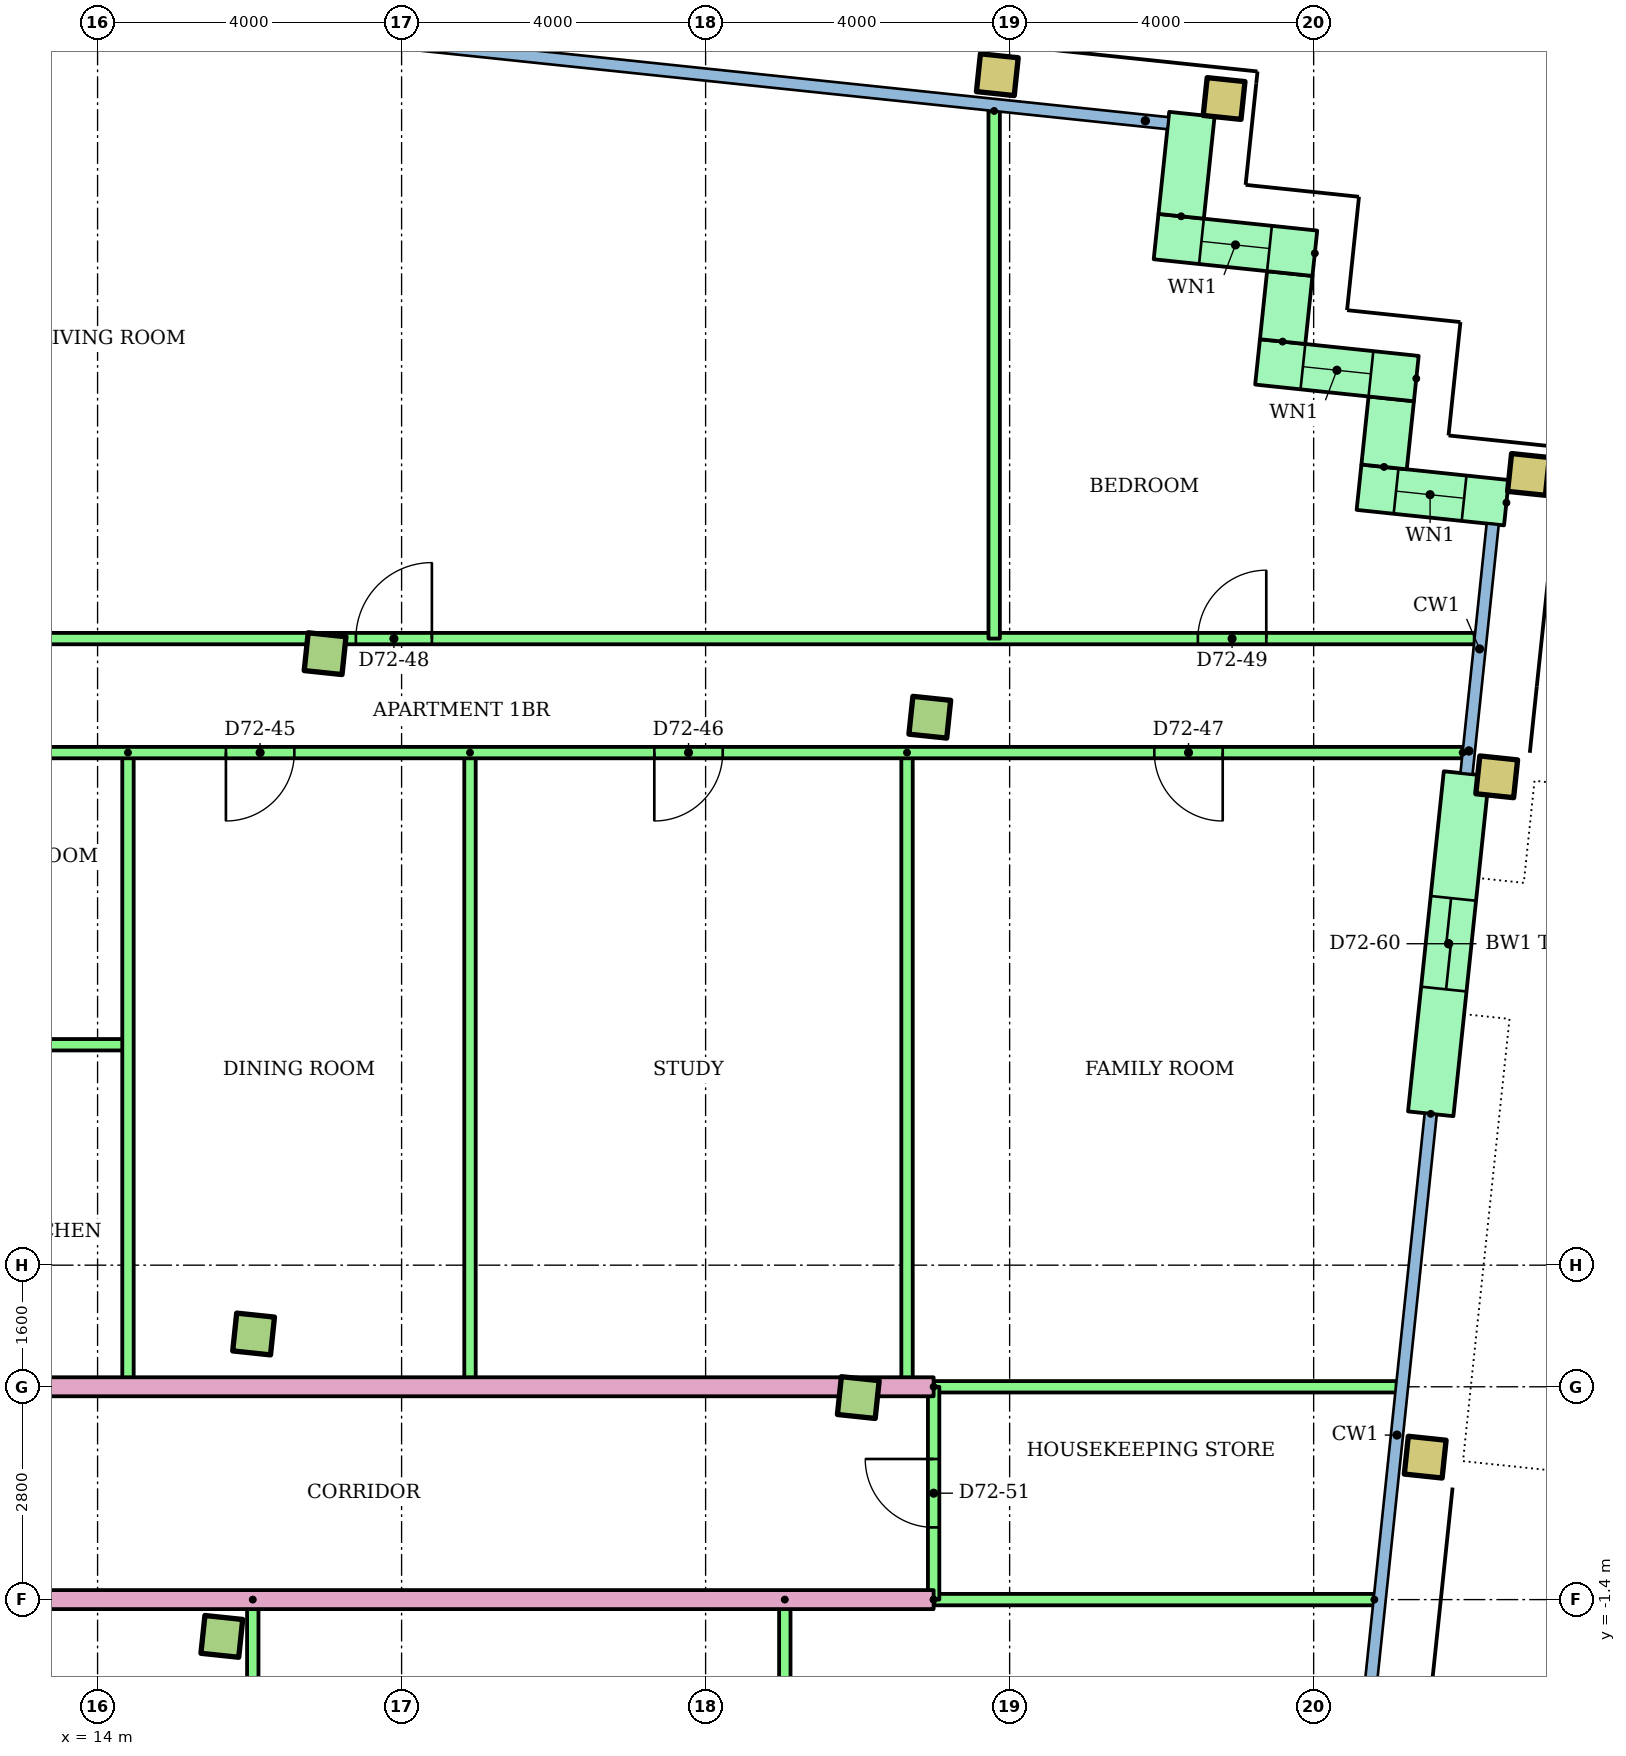
"""IFC4 building model, lengths in metres.
Left out: names, types, materials, properties, quantities, classifications, styles, units other than length and angle.
Written with IfcOpenShell. Run it as: python <this file> out.ifc"""

import sys

from ifc_helpers import new_model, si_unit, direction, frame, frame_2d, origin, origin_2d, place, context, subcontext, project, spatial, rectangle, hollow_rectangle, extrude, element, fill, save


model = new_model("IFC4")
c1 = context("Model", 3, precision=1e-05, world=origin(), true_north=direction((0.0, 1.0)))
c2 = subcontext(c1, "Body", "Model", "MODEL_VIEW")
j1 = project(units=[si_unit("LENGTHUNIT", "METRE"), si_unit("PLANEANGLEUNIT", "RADIAN")], contexts=[c1])
p1 = place(None, origin())
s1 = spatial("IfcSite", under=j1, at=p1, CompositionType="ELEMENT")
p2 = place(p1, origin())
s2 = spatial("IfcBuilding", under=s1, at=p2, CompositionType="ELEMENT")
p3 = place(p2, frame((0.0, 0.0, 275.5)))
s3 = spatial("IfcBuildingStorey", under=s2, at=p3, CompositionType="ELEMENT", Elevation=275.5)
for number, where, z_axis, x_axis in (
    (1, (15.635, -1.884, 0.0), (0.0, 0.0, 1.0), (0.995, -0.105, 0.0)),
    (2, (16.053, 2.094, 0.0), (0.0, 0.0, 1.0), (0.995, -0.105, 0.0)),
    (3, (24.009, 1.258, 0.0), (0.0, 0.0, 1.0), (0.995, -0.105, 0.0)),
):
    element("IfcColumn", number, at=place(p3, frame(where, z_axis=z_axis, x_axis=x_axis)), inside=s3, PredefinedType="COLUMN", context=c2, shape_type="SweptSolid", body=[
        extrude(rectangle(XDim=0.5, YDim=0.5, at=origin_2d()), origin(), (0.0, 0.0, 1.0), 3.2),
    ])
p4 = place(p3, frame((31.468, 0.474, 0.0), z_axis=(0.0, 0.0, 1.0), x_axis=(0.994521895368, -0.104528463268, 0.0)))
e4 = element("IfcColumn", 4, at=p4, inside=s3, PredefinedType="COLUMN", context=c2, shape_type="SweptSolid", body=[
    extrude(hollow_rectangle(XDim=0.5, YDim=0.5, WallThickness=0.025, at=origin_2d()), origin(), (0.0, 0.0, 1.0), 3.2),
])
for number, where, z_axis, x_axis in (
    (5, (16.993, 11.045, 0.0), (0.0, 0.0, 1.0), (0.995, -0.105, 0.0)),
    (6, (24.95, 10.209, 0.0), (0.0, 0.0, 1.0), (0.995, -0.105, 0.0)),
):
    element("IfcColumn", number, at=place(p3, frame(where, z_axis=z_axis, x_axis=x_axis)), inside=s3, PredefinedType="COLUMN", context=c2, shape_type="SweptSolid", body=[
        extrude(rectangle(XDim=0.5, YDim=0.5, at=origin_2d()), origin(), (0.0, 0.0, 1.0), 3.2),
    ])
for number, where, z_axis, x_axis in (
    (7, (32.409, 9.425, 0.0), (0.0, 0.0, 1.0), (0.995, -0.105, 0.0)),
    (8, (32.827, 13.403, 0.0), (0.0, 0.0, 1.0), (0.995, -0.105, 0.0)),
    (9, (25.838, 18.662, 0.0), (0.0, 0.0, 1.0), (0.995, -0.105, 0.0)),
    (10, (28.822, 18.349, 0.0), (0.0, 0.0, 1.0), (0.995, -0.105, 0.0)),
):
    element("IfcColumn", number, at=place(p3, frame(where, z_axis=z_axis, x_axis=x_axis)), inside=s3, PredefinedType="COLUMN", context=c2, shape_type="SweptSolid", body=[
        extrude(hollow_rectangle(XDim=0.5, YDim=0.5, WallThickness=0.025, at=origin_2d()), origin(), (0.0, 0.0, 1.0), 3.2),
    ])
p5 = place(p3, frame((32.536, 13.031, 0.0), z_axis=(0.0, 0.0, 1.0), x_axis=(-0.994534226826, 0.104411070641, 0.0)))
e11 = element("IfcWall", 11, at=p5, inside=s3, PredefinedType="STANDARD", context=c2, shape_type="SweptSolid", body=[
    extrude(rectangle(XDim=1.95, YDim=0.6, at=frame_2d((0.975, 0.0))), origin(), (0.0, 0.0, 1.0), 2.92),
])
p6 = place(p5, frame((0.56, 0.0, 0.9)))
e12 = element("IfcOpeningElement", 12, at=p6, cuts=e11, PredefinedType="OPENING", context=c2, shape_type="SweptSolid", body=[
    extrude(rectangle(XDim=0.9, YDim=1.5, at=frame_2d((0.45, 0.75))), frame((0.0, 0.31, 0.0), z_axis=(0.0, -1.0, 0.0), x_axis=(1.0, 0.0, 0.0)), (0.0, 0.0, 1.0), 0.62),
])
p7 = place(p3, frame((30.927, 13.502, 0.0), z_axis=(0.0, 0.0, 1.0), x_axis=(0.104416541099, 0.994533652495, 0.0)))
e13 = element("IfcWall", 13, at=p7, inside=s3, PredefinedType="STANDARD", context=c2, shape_type="SweptSolid", body=[
    extrude(rectangle(XDim=0.9, YDim=0.6, at=frame_2d((0.45, 0.0))), origin(), (0.0, 0.0, 1.0), 2.92),
])
p8 = place(p3, frame((31.351, 14.664, 0.0), z_axis=(0.0, 0.0, 1.0), x_axis=(-0.994523910136, 0.104509292252, 0.0)))
e14 = element("IfcWall", 14, at=p8, inside=s3, PredefinedType="STANDARD", context=c2, shape_type="SweptSolid", body=[
    extrude(rectangle(XDim=2.1, YDim=0.6, at=frame_2d((1.05, 0.0))), origin(), (0.0, 0.0, 1.0), 2.92),
])
p9 = place(p8, frame((0.6, 0.0, 0.9)))
e15 = element("IfcOpeningElement", 15, at=p9, cuts=e14, PredefinedType="OPENING", context=c2, shape_type="SweptSolid", body=[
    extrude(rectangle(XDim=0.9, YDim=1.5, at=frame_2d((0.45, 0.75))), frame((0.0, 0.31, 0.0), z_axis=(0.0, -1.0, 0.0), x_axis=(1.0, 0.0, 0.0)), (0.0, 0.0, 1.0), 0.62),
])
p10 = place(p3, frame((29.592, 15.151, 0.0), z_axis=(0.0, 0.0, 1.0), x_axis=(0.104444712852, 0.994530694326, 0.0)))
e16 = element("IfcWall", 16, at=p10, inside=s3, PredefinedType="STANDARD", context=c2, shape_type="SweptSolid", body=[
    extrude(rectangle(XDim=0.9, YDim=0.6, at=frame_2d((0.45, 0.0))), origin(), (0.0, 0.0, 1.0), 2.92),
])
p11 = place(p3, frame((30.015, 16.312, 0.0), z_axis=(0.0, 0.0, 1.0), x_axis=(-0.994510548187, 0.104636368175, 0.0)))
e17 = element("IfcWall", 17, at=p11, inside=s3, PredefinedType="STANDARD", context=c2, shape_type="SweptSolid", body=[
    extrude(rectangle(XDim=2.1, YDim=0.6, at=frame_2d((1.05, 0.0))), origin(), (0.0, 0.0, 1.0), 2.92),
])
p12 = place(p11, frame((0.6, 0.0, 0.9)))
e18 = element("IfcOpeningElement", 18, at=p12, cuts=e17, PredefinedType="OPENING", context=c2, shape_type="SweptSolid", body=[
    extrude(rectangle(XDim=0.9, YDim=1.5, at=frame_2d((0.45, 0.75))), frame((0.0, 0.31, 0.0), z_axis=(0.0, -1.0, 0.0), x_axis=(1.0, 0.0, 0.0)), (0.0, 0.0, 1.0), 0.62),
])
p13 = place(p3, frame((28.257, 16.799, 0.0), z_axis=(0.0, 0.0, 1.0), x_axis=(0.104534153452, 0.994521297289, 0.0)))
e19 = element("IfcWall", 19, at=p13, inside=s3, PredefinedType="STANDARD", context=c2, shape_type="SweptSolid", body=[
    extrude(rectangle(XDim=1.35, YDim=0.6, at=frame_2d((0.675, 0.0))), origin(), (0.0, 0.0, 1.0), 2.92),
])
p14 = place(p3, frame((31.54, 4.991, 0.0), z_axis=(0.0, 0.0, 1.0), x_axis=(0.104546400045, 0.994520009974, 0.0)))
e20 = element("IfcWall", 20, at=p14, inside=s3, PredefinedType="STANDARD", context=c2, shape_type="SweptSolid", body=[
    extrude(rectangle(XDim=4.5, YDim=0.6, at=frame_2d((2.25, 0.0))), origin(), (0.0, 0.0, 1.0), 2.92),
])
p15 = place(p14, frame((1.65, 0.0, 0.0)))
e21 = element("IfcOpeningElement", 21, at=p15, cuts=e20, PredefinedType="OPENING", context=c2, shape_type="SweptSolid", body=[
    extrude(rectangle(XDim=1.2, YDim=2.1, at=frame_2d((0.6, 1.05))), frame((0.0, 0.31, 0.0), z_axis=(0.0, -1.0, 0.0), x_axis=(1.0, 0.0, 0.0)), (0.0, 0.0, 1.0), 0.62),
])
for number, where, z_axis, x_axis in (
    (22, (16.042, -1.4, 0.0), (0.0, 0.0, 1.0), (0.0, -1.0, 0.0)),
    (23, (23.042, -1.4, 0.0), (0.0, 0.0, 1.0), (0.0, -1.0, 0.0)),
):
    element("IfcWall", number, at=place(p3, frame(where, z_axis=z_axis, x_axis=x_axis)), inside=s3, PredefinedType="PARTITIONING", context=c2, shape_type="SweptSolid", body=[
        extrude(rectangle(XDim=6.582, YDim=0.15, at=frame_2d((3.291, 0.0))), origin(), (0.0, 0.0, 1.0), 2.4),
    ])
p16 = place(p3, frame((25.0, -1.4, 0.0), z_axis=(0.0, 0.0, 1.0), x_axis=(-1.0, 0.0, 0.0)))
e24 = element("IfcWall", 24, at=p16, inside=s3, PredefinedType="PARTITIONING", context=c2, shape_type="SweptSolid", body=[
    extrude(rectangle(XDim=15.0, YDim=0.25, at=frame_2d((7.5, 0.0))), origin(), (0.0, 0.0, 1.0), 2.4),
])
p17 = place(p3, frame((30.798, -1.4, 0.0), z_axis=(0.0, 0.0, 1.0), x_axis=(-1.0, 0.0, 0.0)))
e25 = element("IfcWall", 25, at=p17, inside=s3, PredefinedType="PARTITIONING", context=c2, shape_type="SweptSolid", body=[
    extrude(rectangle(XDim=5.798, YDim=0.15, at=frame_2d((2.899, 0.0))), origin(), (0.0, 0.0, 1.0), 2.4),
])
p18 = place(p3, frame((12.0, 5.9, 0.0)))
e26 = element("IfcWall", 26, at=p18, inside=s3, PredefinedType="PARTITIONING", context=c2, shape_type="SweptSolid", body=[
    extrude(rectangle(XDim=2.4, YDim=0.15, at=frame_2d((1.2, 0.0))), origin(), (0.0, 0.0, 1.0), 2.4),
])
for number, where, z_axis, x_axis in (
    (27, (14.4, 9.743, 0.0), (0.0, 0.0, 1.0), (0.0, -1.0, 0.0)),
    (28, (18.9, 9.743, 0.0), (0.0, 0.0, 1.0), (0.0, -1.0, 0.0)),
    (29, (24.65, 9.743, 0.0), (0.0, 0.0, 1.0), (0.0, -1.0, 0.0)),
):
    element("IfcWall", number, at=place(p3, frame(where, z_axis=z_axis, x_axis=x_axis)), inside=s3, PredefinedType="PARTITIONING", context=c2, shape_type="SweptSolid", body=[
        extrude(rectangle(XDim=8.344, YDim=0.15, at=frame_2d((4.172, 0.0))), origin(), (0.0, 0.0, 1.0), 2.4),
    ])
p19 = place(p3, frame((31.96, 9.743, 0.0), z_axis=(0.0, 0.0, 1.0), x_axis=(-1.0, 0.0, 0.0)))
e30 = element("IfcWall", 30, at=p19, inside=s3, PredefinedType="PARTITIONING", context=c2, shape_type="SweptSolid", body=[
    extrude(rectangle(XDim=19.96, YDim=0.15, at=frame_2d((9.98, 0.0))), origin(), (0.0, 0.0, 1.0), 2.4),
])
p20 = place(p19, frame((15.372, 0.0, 0.0)))
e31 = element("IfcOpeningElement", 31, at=p20, cuts=e30, PredefinedType="OPENING", context=c2, shape_type="SweptSolid", body=[
    extrude(rectangle(XDim=0.9, YDim=2.1, at=frame_2d((0.45, 1.05))), frame((0.0, 0.085, 0.0), z_axis=(0.0, -1.0, 0.0), x_axis=(1.0, 0.0, 0.0)), (0.0, 0.0, 1.0), 0.17),
])
p21 = place(p19, frame((9.735, 0.0, 0.0)))
e32 = element("IfcOpeningElement", 32, at=p21, cuts=e30, PredefinedType="OPENING", context=c2, shape_type="SweptSolid", body=[
    extrude(rectangle(XDim=0.9, YDim=2.1, at=frame_2d((0.45, 1.05))), frame((0.0, 0.085, 0.0), z_axis=(0.0, -1.0, 0.0), x_axis=(1.0, 0.0, 0.0)), (0.0, 0.0, 1.0), 0.17),
])
p22 = place(p19, frame((3.157, 0.0, 0.0)))
e33 = element("IfcOpeningElement", 33, at=p22, cuts=e30, PredefinedType="OPENING", context=c2, shape_type="SweptSolid", body=[
    extrude(rectangle(XDim=0.9, YDim=2.1, at=frame_2d((0.45, 1.05))), frame((0.0, 0.085, 0.0), z_axis=(0.0, -1.0, 0.0), x_axis=(1.0, 0.0, 0.0)), (0.0, 0.0, 1.0), 0.17),
])
p23 = place(p3, frame((10.0, 11.243, 0.0)))
e34 = element("IfcWall", 34, at=p23, inside=s3, PredefinedType="PARTITIONING", context=c2, shape_type="SweptSolid", body=[
    extrude(rectangle(XDim=22.118, YDim=0.15, at=frame_2d((11.059, 0.0))), origin(), (0.0, 0.0, 1.0), 2.4),
])
p24 = place(p23, frame((7.398, 0.0, 0.0)))
e35 = element("IfcOpeningElement", 35, at=p24, cuts=e34, PredefinedType="OPENING", context=c2, shape_type="SweptSolid", body=[
    extrude(rectangle(XDim=1.0, YDim=2.1, at=frame_2d((0.5, 1.05))), frame((0.0, 0.085, 0.0), z_axis=(0.0, -1.0, 0.0), x_axis=(1.0, 0.0, 0.0)), (0.0, 0.0, 1.0), 0.17),
])
p25 = place(p23, frame((18.477, 0.0, 0.0)))
e36 = element("IfcOpeningElement", 36, at=p25, cuts=e34, PredefinedType="OPENING", context=c2, shape_type="SweptSolid", body=[
    extrude(rectangle(XDim=0.9, YDim=2.1, at=frame_2d((0.45, 1.05))), frame((0.0, 0.085, 0.0), z_axis=(0.0, -1.0, 0.0), x_axis=(1.0, 0.0, 0.0)), (0.0, 0.0, 1.0), 0.17),
])
p26 = place(p3, frame((25.796, 18.185, 0.0), z_axis=(0.0, 0.0, 1.0), x_axis=(0.0, -1.0, 0.0)))
e37 = element("IfcWall", 37, at=p26, inside=s3, PredefinedType="PARTITIONING", context=c2, shape_type="SweptSolid", body=[
    extrude(rectangle(XDim=6.941, YDim=0.15, at=frame_2d((3.471, 0.0))), origin(), (0.0, 0.0, 1.0), 2.4),
])
p27 = place(p3, frame((10.0, 1.4, 0.0)))
e38 = element("IfcWall", 38, at=p27, inside=s3, PredefinedType="PARTITIONING", context=c2, shape_type="SweptSolid", body=[
    extrude(rectangle(XDim=15.0, YDim=0.25, at=frame_2d((7.5, 0.0))), origin(), (0.0, 0.0, 1.0), 2.4),
])
p28 = place(p27, frame((0.5, 0.0, 0.0)))
e39 = element("IfcOpeningElement", 39, at=p28, cuts=e38, PredefinedType="OPENING", context=c2, shape_type="SweptSolid", body=[
    extrude(rectangle(XDim=1.0, YDim=2.1, at=frame_2d((0.5, 1.05))), frame((0.0, 0.135, 0.0), z_axis=(0.0, -1.0, 0.0), x_axis=(1.0, 0.0, 0.0)), (0.0, 0.0, 1.0), 0.27),
])
p29 = place(p3, frame((25.0, 1.4, 0.0)))
e40 = element("IfcWall", 40, at=p29, inside=s3, PredefinedType="PARTITIONING", context=c2, shape_type="SweptSolid", body=[
    extrude(rectangle(XDim=6.093, YDim=0.15, at=frame_2d((3.046, 0.0))), origin(), (0.0, 0.0, 1.0), 2.4),
])
p30 = place(p3, frame((25.0, -1.4, 0.0), z_axis=(0.0, 0.0, 1.0), x_axis=(0.0, 1.0, 0.0)))
e41 = element("IfcWall", 41, at=p30, inside=s3, PredefinedType="PARTITIONING", context=c2, shape_type="SweptSolid", body=[
    extrude(rectangle(XDim=2.8, YDim=0.15, at=frame_2d((1.4, 0.0))), origin(), (0.0, 0.0, 1.0), 2.4),
])
p31 = place(p30, frame((0.95, 0.0, 0.0)))
e42 = element("IfcOpeningElement", 42, at=p31, cuts=e41, PredefinedType="OPENING", context=c2, shape_type="SweptSolid", body=[
    extrude(rectangle(XDim=0.9, YDim=2.1, at=frame_2d((0.45, 1.05))), frame((0.0, 0.085, 0.0), z_axis=(0.0, -1.0, 0.0), x_axis=(1.0, 0.0, 0.0)), (0.0, 0.0, 1.0), 0.17),
])
p32 = place(p6, origin())
e43 = element("IfcWindow", 43, at=p32, inside=s3, PartitioningType="SINGLE_PANEL", PredefinedType="WINDOW", context=c2, shape_type="SweptSolid", body=[
    extrude(rectangle(XDim=0.9, YDim=1.5, at=frame_2d((0.45, 0.75))), frame((0.0, 0.03, 0.0), z_axis=(0.0, -1.0, 0.0), x_axis=(1.0, 0.0, 0.0)), (0.0, 0.0, 1.0), 0.06),
])
fill(e12, e43)
p33 = place(p9, origin())
e44 = element("IfcWindow", 44, at=p33, inside=s3, PartitioningType="SINGLE_PANEL", PredefinedType="WINDOW", context=c2, shape_type="SweptSolid", body=[
    extrude(rectangle(XDim=0.9, YDim=1.5, at=frame_2d((0.45, 0.75))), frame((0.0, 0.03, 0.0), z_axis=(0.0, -1.0, 0.0), x_axis=(1.0, 0.0, 0.0)), (0.0, 0.0, 1.0), 0.06),
])
fill(e15, e44)
p34 = place(p12, origin())
e45 = element("IfcWindow", 45, at=p34, inside=s3, PartitioningType="SINGLE_PANEL", PredefinedType="WINDOW", context=c2, shape_type="SweptSolid", body=[
    extrude(rectangle(XDim=0.9, YDim=1.5, at=frame_2d((0.45, 0.75))), frame((0.0, 0.03, 0.0), z_axis=(0.0, -1.0, 0.0), x_axis=(1.0, 0.0, 0.0)), (0.0, 0.0, 1.0), 0.06),
])
fill(e18, e45)
p35 = place(p20, origin())
e46 = element("IfcDoor", 46, at=p35, inside=s3, OperationType="SINGLE_SWING_RIGHT", PredefinedType="DOOR", context=c2, shape_type="SweptSolid", body=[
    extrude(rectangle(XDim=0.9, YDim=2.1, at=frame_2d((0.45, 1.05))), frame((0.0, 0.025, 0.0), z_axis=(0.0, -1.0, 0.0), x_axis=(1.0, 0.0, 0.0)), (0.0, 0.0, 1.0), 0.05),
])
fill(e31, e46)
p36 = place(p21, origin())
e47 = element("IfcDoor", 47, at=p36, inside=s3, OperationType="SINGLE_SWING_RIGHT", PredefinedType="DOOR", context=c2, shape_type="SweptSolid", body=[
    extrude(rectangle(XDim=0.9, YDim=2.1, at=frame_2d((0.45, 1.05))), frame((0.0, 0.025, 0.0), z_axis=(0.0, -1.0, 0.0), x_axis=(1.0, 0.0, 0.0)), (0.0, 0.0, 1.0), 0.05),
])
fill(e32, e47)
p37 = place(p22, origin())
e48 = element("IfcDoor", 48, at=p37, inside=s3, OperationType="SINGLE_SWING_LEFT", PredefinedType="DOOR", context=c2, shape_type="SweptSolid", body=[
    extrude(rectangle(XDim=0.9, YDim=2.1, at=frame_2d((0.45, 1.05))), frame((0.0, 0.025, 0.0), z_axis=(0.0, -1.0, 0.0), x_axis=(1.0, 0.0, 0.0)), (0.0, 0.0, 1.0), 0.05),
])
fill(e33, e48)
p38 = place(p24, origin())
e49 = element("IfcDoor", 49, at=p38, inside=s3, OperationType="SINGLE_SWING_RIGHT", PredefinedType="DOOR", context=c2, shape_type="SweptSolid", body=[
    extrude(rectangle(XDim=1.0, YDim=2.1, at=frame_2d((0.5, 1.05))), frame((0.0, 0.025, 0.0), z_axis=(0.0, -1.0, 0.0), x_axis=(1.0, 0.0, 0.0)), (0.0, 0.0, 1.0), 0.05),
])
fill(e35, e49)
p39 = place(p25, origin())
e50 = element("IfcDoor", 50, at=p39, inside=s3, OperationType="SINGLE_SWING_RIGHT", PredefinedType="DOOR", context=c2, shape_type="SweptSolid", body=[
    extrude(rectangle(XDim=0.9, YDim=2.1, at=frame_2d((0.45, 1.05))), frame((0.0, 0.025, 0.0), z_axis=(0.0, -1.0, 0.0), x_axis=(1.0, 0.0, 0.0)), (0.0, 0.0, 1.0), 0.05),
])
fill(e36, e50)
p40 = place(p31, origin())
e51 = element("IfcDoor", 51, at=p40, inside=s3, OperationType="SINGLE_SWING_RIGHT", PredefinedType="DOOR", context=c2, shape_type="SweptSolid", body=[
    extrude(rectangle(XDim=0.9, YDim=2.1, at=frame_2d((0.45, 1.05))), frame((0.0, 0.025, 0.0), z_axis=(0.0, -1.0, 0.0), x_axis=(1.0, 0.0, 0.0)), (0.0, 0.0, 1.0), 0.05),
])
fill(e42, e51)
p41 = place(p15, origin())
e52 = element("IfcDoor", 52, at=p41, inside=s3, OperationType="SLIDING_TO_LEFT", PredefinedType="DOOR", context=c2, shape_type="SweptSolid", body=[
    extrude(rectangle(XDim=1.2, YDim=2.1, at=frame_2d((0.6, 1.05))), frame((0.0, 0.025, 0.0), z_axis=(0.0, -1.0, 0.0), x_axis=(1.0, 0.0, 0.0)), (0.0, 0.0, 1.0), 0.05),
])
fill(e21, e52)
save(model, sys.argv[1])
